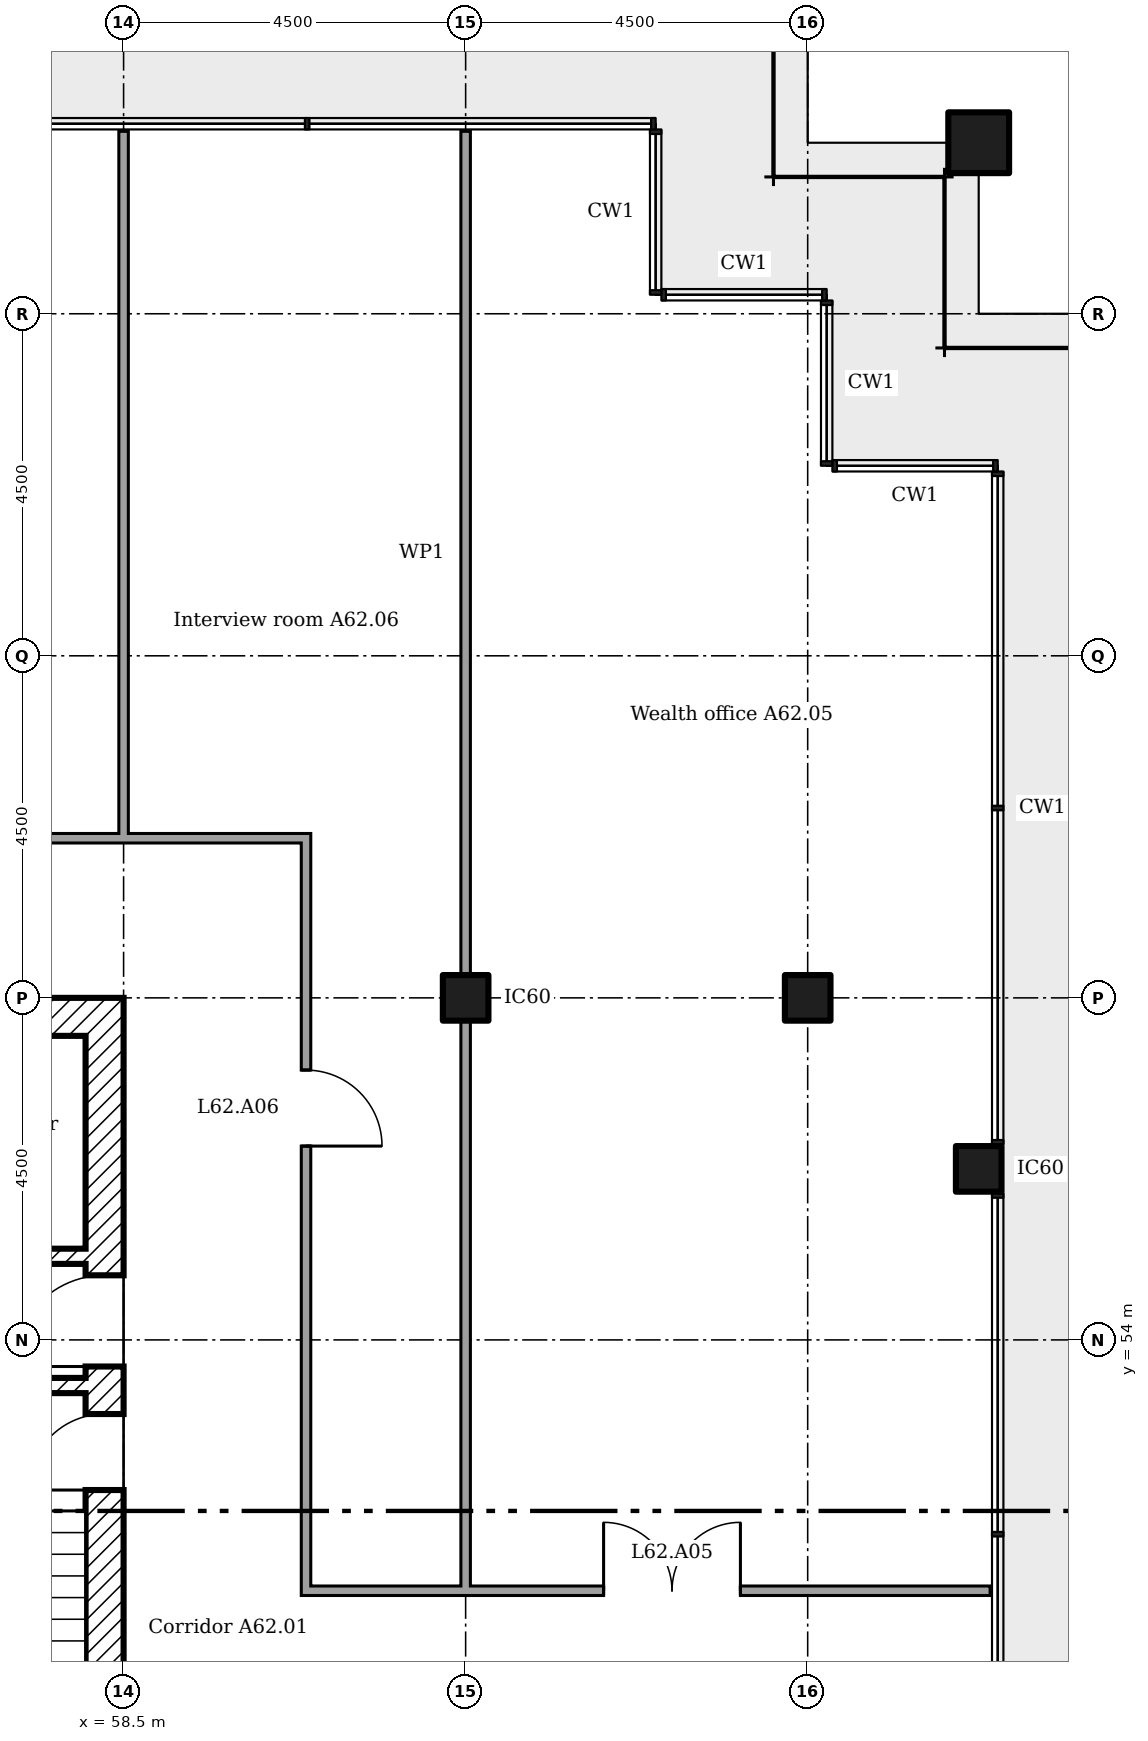
"""IFC4 building model, lengths in metres.
Left out: names, types, materials, properties, quantities, classifications, styles, units other than length and angle.
Written with IfcOpenShell. Run it as: python <this file> out.ifc"""

import sys

from ifc_helpers import new_model, si_unit, direction, frame, frame_2d, origin, origin_2d, place, context, subcontext, project, spatial, rectangle, extrude, element, fill, save


model = new_model("IFC4")
c1 = context("Model", 3, precision=1e-05, world=origin(), true_north=direction((0.0, 1.0)))
c2 = subcontext(c1, "Body", "Model", "MODEL_VIEW")
j1 = project(units=[si_unit("LENGTHUNIT", "METRE"), si_unit("PLANEANGLEUNIT", "RADIAN")], contexts=[c1])
p1 = place(None, origin())
s1 = spatial("IfcSite", under=j1, at=p1, CompositionType="ELEMENT")
p2 = place(p1, origin())
s2 = spatial("IfcBuilding", under=s1, at=p2, CompositionType="ELEMENT")
p3 = place(p2, frame((0.0, 0.0, 242.4)))
s3 = spatial("IfcBuildingStorey", under=s2, at=p3, CompositionType="ELEMENT", Elevation=242.4)
p4 = place(p3, frame((69.75, 69.75, 0.0)))
e1 = element("IfcColumn", 1, at=p4, inside=s3, PredefinedType="COLUMN", context=c2, shape_type="SweptSolid", body=[
    extrude(rectangle(XDim=0.8, YDim=0.8, at=origin_2d()), origin(), (0.0, 0.0, 1.0), 3.6),
])
for number, where in (
    (2, (63.0, 58.5, 0.0)),
    (3, (67.5, 58.5, 0.0)),
    (4, (69.75, 56.25, 0.0)),
):
    element("IfcColumn", number, at=place(p3, frame(where)), inside=s3, PredefinedType="COLUMN", context=c2, shape_type="SweptSolid", body=[
        extrude(rectangle(XDim=0.6, YDim=0.6, at=origin_2d()), origin(), (0.0, 0.0, 1.0), 3.6),
    ])
p5 = place(p3, frame((58.25, 40.5, 0.0), z_axis=(0.0, 0.0, 1.0), x_axis=(0.0, 1.0, 0.0)))
e5 = element("IfcWall", 5, at=p5, inside=s3, PredefinedType="SHEAR", context=c2, shape_type="SweptSolid", body=[
    extrude(rectangle(XDim=18.0, YDim=0.5, at=frame_2d((9.0, 0.0))), origin(), (0.0, 0.0, 1.0), 3.3),
])
p6 = place(p5, frame((13.15, 0.0, 0.0)))
e6 = element("IfcOpeningElement", 6, at=p6, cuts=e5, PredefinedType="OPENING", context=c2, shape_type="SweptSolid", body=[
    extrude(rectangle(XDim=1.2, YDim=2.1, at=frame_2d((0.6, 1.05))), frame((0.0, 0.26, 0.0), z_axis=(0.0, -1.0, 0.0), x_axis=(1.0, 0.0, 0.0)), (0.0, 0.0, 1.0), 0.52),
])
p7 = place(p5, frame((3.9, 0.0, 0.0)))
e7 = element("IfcOpeningElement", 7, at=p7, cuts=e5, PredefinedType="OPENING", context=c2, shape_type="SweptSolid", body=[
    extrude(rectangle(XDim=1.8, YDim=2.1, at=frame_2d((0.9, 1.05))), frame((0.0, 0.26, 0.0), z_axis=(0.0, -1.0, 0.0), x_axis=(1.0, 0.0, 0.0)), (0.0, 0.0, 1.0), 0.52),
])
p8 = place(p5, frame((11.525, 0.0, 0.0)))
e8 = element("IfcOpeningElement", 8, at=p8, cuts=e5, PredefinedType="OPENING", context=c2, shape_type="SweptSolid", body=[
    extrude(rectangle(XDim=1.0, YDim=2.1, at=frame_2d((0.5, 1.05))), frame((0.0, 0.26, 0.0), z_axis=(0.0, -1.0, 0.0), x_axis=(1.0, 0.0, 0.0)), (0.0, 0.0, 1.0), 0.52),
])
p9 = place(p3, frame((40.5, 58.25, 0.0)))
e9 = element("IfcWall", 9, at=p9, inside=s3, PredefinedType="SHEAR", context=c2, shape_type="SweptSolid", body=[
    extrude(rectangle(XDim=17.5, YDim=0.5, at=frame_2d((8.75, 0.0))), origin(), (0.0, 0.0, 1.0), 3.3),
])
p10 = place(p3, frame((46.933, 55.1, 0.0)))
e10 = element("IfcWall", 10, at=p10, inside=s3, PredefinedType="SHEAR", context=c2, shape_type="SweptSolid", body=[
    extrude(rectangle(XDim=11.067, YDim=0.2, at=frame_2d((5.533, 0.0))), origin(), (0.0, 0.0, 1.0), 3.3),
])
p11 = place(p10, frame((8.833, 0.0, 0.0)))
e11 = element("IfcOpeningElement", 11, at=p11, cuts=e10, PredefinedType="OPENING", context=c2, shape_type="SweptSolid", body=[
    extrude(rectangle(XDim=0.9, YDim=2.1, at=frame_2d((0.45, 1.05))), frame((0.0, 0.11, 0.0), z_axis=(0.0, -1.0, 0.0), x_axis=(1.0, 0.0, 0.0)), (0.0, 0.0, 1.0), 0.22),
])
p12 = place(p10, frame((0.633, 0.0, 0.0)))
e12 = element("IfcOpeningElement", 12, at=p12, cuts=e10, PredefinedType="OPENING", context=c2, shape_type="SweptSolid", body=[
    extrude(rectangle(XDim=1.2, YDim=2.1, at=frame_2d((0.6, 1.05))), frame((0.0, 0.11, 0.0), z_axis=(0.0, -1.0, 0.0), x_axis=(1.0, 0.0, 0.0)), (0.0, 0.0, 1.0), 0.22),
])
p13 = place(p10, frame((3.3, 0.0, 0.0)))
e13 = element("IfcOpeningElement", 13, at=p13, cuts=e10, PredefinedType="OPENING", context=c2, shape_type="SweptSolid", body=[
    extrude(rectangle(XDim=1.2, YDim=2.1, at=frame_2d((0.6, 1.05))), frame((0.0, 0.11, 0.0), z_axis=(0.0, -1.0, 0.0), x_axis=(1.0, 0.0, 0.0)), (0.0, 0.0, 1.0), 0.22),
])
p14 = place(p10, frame((5.967, 0.0, 0.0)))
e14 = element("IfcOpeningElement", 14, at=p14, cuts=e10, PredefinedType="OPENING", context=c2, shape_type="SweptSolid", body=[
    extrude(rectangle(XDim=1.2, YDim=2.1, at=frame_2d((0.6, 1.05))), frame((0.0, 0.11, 0.0), z_axis=(0.0, -1.0, 0.0), x_axis=(1.0, 0.0, 0.0)), (0.0, 0.0, 1.0), 0.22),
])
p15 = place(p3, frame((54.8, 53.4, 0.0)))
e15 = element("IfcWall", 15, at=p15, inside=s3, PredefinedType="SHEAR", context=c2, shape_type="SweptSolid", body=[
    extrude(rectangle(XDim=3.2, YDim=0.2, at=frame_2d((1.6, 0.0))), origin(), (0.0, 0.0, 1.0), 3.3),
])
p16 = place(p15, frame((0.95, 0.0, 0.0)))
e16 = element("IfcOpeningElement", 16, at=p16, cuts=e15, PredefinedType="OPENING", context=c2, shape_type="SweptSolid", body=[
    extrude(rectangle(XDim=1.0, YDim=2.1, at=frame_2d((0.5, 1.05))), frame((0.0, 0.11, 0.0), z_axis=(0.0, -1.0, 0.0), x_axis=(1.0, 0.0, 0.0)), (0.0, 0.0, 1.0), 0.22),
])
p17 = place(p3, frame((60.837, 50.7, 0.0)))
e17 = element("IfcWall", 17, at=p17, inside=s3, PredefinedType="PARTITIONING", context=c2, shape_type="SweptSolid", body=[
    extrude(rectangle(XDim=9.062, YDim=0.125, at=frame_2d((4.531, 0.0))), origin(), (0.0, 0.0, 1.0), 3.4),
])
p18 = place(p17, frame((3.978, 0.0, 0.0)))
e18 = element("IfcOpeningElement", 18, at=p18, cuts=e17, PredefinedType="OPENING", context=c2, shape_type="SweptSolid", body=[
    extrude(rectangle(XDim=1.8, YDim=2.1, at=frame_2d((0.9, 1.05))), frame((0.0, 0.073, 0.0), z_axis=(0.0, -1.0, 0.0), x_axis=(1.0, 0.0, 0.0)), (0.0, 0.0, 1.0), 0.145),
])
p19 = place(p3, frame((42.6, 60.6, 0.0)))
e19 = element("IfcWall", 19, at=p19, inside=s3, PredefinedType="PARTITIONING", context=c2, shape_type="SweptSolid", body=[
    extrude(rectangle(XDim=18.362, YDim=0.125, at=frame_2d((9.181, 0.0))), origin(), (0.0, 0.0, 1.0), 3.4),
])
p20 = place(p19, frame((7.05, 0.0, 0.0)))
e20 = element("IfcOpeningElement", 20, at=p20, cuts=e19, PredefinedType="OPENING", context=c2, shape_type="SweptSolid", body=[
    extrude(rectangle(XDim=1.8, YDim=2.1, at=frame_2d((0.9, 1.05))), frame((0.0, 0.073, 0.0), z_axis=(0.0, -1.0, 0.0), x_axis=(1.0, 0.0, 0.0)), (0.0, 0.0, 1.0), 0.145),
])
p21 = place(p3, frame((58.5, 60.6, 0.0), z_axis=(0.0, 0.0, 1.0), x_axis=(0.0, 1.0, 0.0)))
e21 = element("IfcWall", 21, at=p21, inside=s3, PredefinedType="PARTITIONING", context=c2, shape_type="SweptSolid", body=[
    extrude(rectangle(XDim=9.3, YDim=0.125, at=frame_2d((4.65, 0.0))), origin(), (0.0, 0.0, 1.0), 2.626),
])
p22 = place(p3, frame((60.9, 50.762, 0.0), z_axis=(0.0, 0.0, 1.0), x_axis=(0.0, 1.0, 0.0)))
e22 = element("IfcWall", 22, at=p22, inside=s3, PredefinedType="PARTITIONING", context=c2, shape_type="SweptSolid", body=[
    extrude(rectangle(XDim=9.775, YDim=0.125, at=frame_2d((4.888, 0.0))), origin(), (0.0, 0.0, 1.0), 3.4),
])
p23 = place(p22, frame((5.788, 0.0, 0.0)))
e23 = element("IfcOpeningElement", 23, at=p23, cuts=e22, PredefinedType="OPENING", context=c2, shape_type="SweptSolid", body=[
    extrude(rectangle(XDim=1.0, YDim=2.1, at=frame_2d((0.5, 1.05))), frame((0.0, 0.073, 0.0), z_axis=(0.0, -1.0, 0.0), x_axis=(1.0, 0.0, 0.0)), (0.0, 0.0, 1.0), 0.145),
])
p24 = place(p3, frame((63.0, 50.7, 0.0), z_axis=(0.0, 0.0, 1.0), x_axis=(0.0, 1.0, 0.0)))
e24 = element("IfcWall", 24, at=p24, inside=s3, PredefinedType="PARTITIONING", context=c2, shape_type="SweptSolid", body=[
    extrude(rectangle(XDim=7.5, YDim=0.125, at=frame_2d((3.75, 0.0))), origin(), (0.0, 0.0, 1.0), 3.4),
])
p25 = place(p3, frame((63.0, 58.8, 0.0), z_axis=(0.0, 0.0, 1.0), x_axis=(0.0, 1.0, 0.0)))
e25 = element("IfcWall", 25, at=p25, inside=s3, PredefinedType="PARTITIONING", context=c2, shape_type="SweptSolid", body=[
    extrude(rectangle(XDim=11.1, YDim=0.125, at=frame_2d((5.55, 0.0))), origin(), (0.0, 0.0, 1.0), 2.626),
])
p26 = place(p6, origin())
e26 = element("IfcDoor", 26, at=p26, inside=s3, OperationType="SINGLE_SWING_RIGHT", PredefinedType="DOOR", context=c2, shape_type="SweptSolid", body=[
    extrude(rectangle(XDim=1.2, YDim=2.1, at=frame_2d((0.6, 1.05))), frame((0.0, 0.025, 0.0), z_axis=(0.0, -1.0, 0.0), x_axis=(1.0, 0.0, 0.0)), (0.0, 0.0, 1.0), 0.05),
])
fill(e6, e26)
p27 = place(p8, origin())
e27 = element("IfcDoor", 27, at=p27, inside=s3, OperationType="SINGLE_SWING_RIGHT", PredefinedType="DOOR", context=c2, shape_type="SweptSolid", body=[
    extrude(rectangle(XDim=1.0, YDim=2.1, at=frame_2d((0.5, 1.05))), frame((0.0, 0.025, 0.0), z_axis=(0.0, -1.0, 0.0), x_axis=(1.0, 0.0, 0.0)), (0.0, 0.0, 1.0), 0.05),
])
fill(e8, e27)
p28 = place(p18, origin())
e28 = element("IfcDoor", 28, at=p28, inside=s3, OperationType="DOUBLE_DOOR_SINGLE_SWING", PredefinedType="DOOR", context=c2, shape_type="SweptSolid", body=[
    extrude(rectangle(XDim=1.8, YDim=2.1, at=frame_2d((0.9, 1.05))), frame((0.0, 0.025, 0.0), z_axis=(0.0, -1.0, 0.0), x_axis=(1.0, 0.0, 0.0)), (0.0, 0.0, 1.0), 0.05),
])
fill(e18, e28)
p29 = place(p23, frame((1.0, 0.0, 0.0), x_axis=(-1.0, 0.0, 0.0)))
e29 = element("IfcDoor", 29, at=p29, inside=s3, OperationType="SINGLE_SWING_LEFT", PredefinedType="DOOR", context=c2, shape_type="SweptSolid", body=[
    extrude(rectangle(XDim=1.0, YDim=2.1, at=frame_2d((0.5, 1.05))), frame((0.0, 0.025, 0.0), z_axis=(0.0, -1.0, 0.0), x_axis=(1.0, 0.0, 0.0)), (0.0, 0.0, 1.0), 0.05),
])
fill(e23, e29)
save(model, sys.argv[1])
